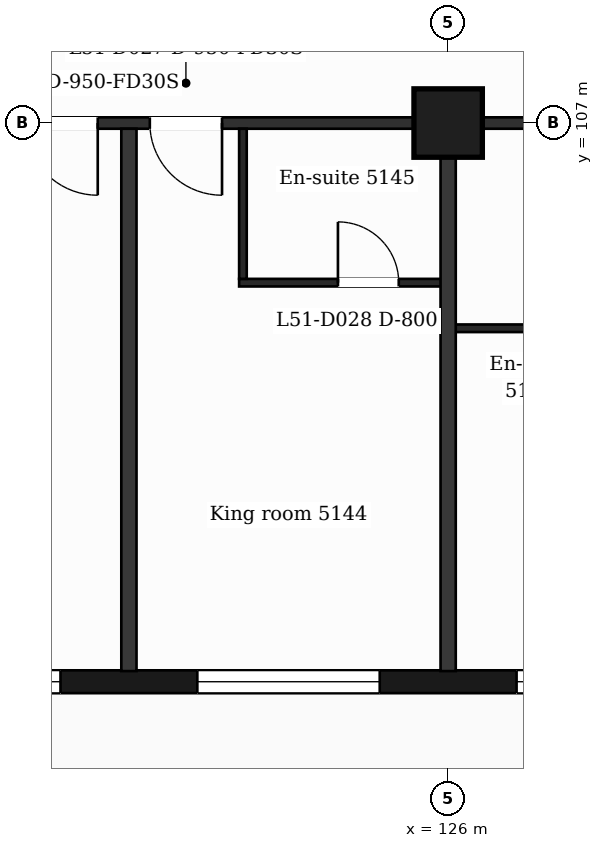
"""IFC4 building model, lengths in metres.
Left out: names, types, materials, properties, quantities, classifications, styles, units other than length and angle.
Written with IfcOpenShell. Run it as: python <this file> out.ifc"""

import sys

from ifc_helpers import new_model, si_unit, direction, frame, frame_2d, origin, origin_2d, place, context, subcontext, project, spatial, rectangle, extrude, element, fill, save


model = new_model("IFC4")
c1 = context("Model", 3, precision=1e-05, world=origin(), true_north=direction((0.0, 1.0)))
c2 = subcontext(c1, "Body", "Model", "MODEL_VIEW")
j1 = project(units=[si_unit("LENGTHUNIT", "METRE"), si_unit("PLANEANGLEUNIT", "RADIAN")], contexts=[c1])
p1 = place(None, origin())
s1 = spatial("IfcSite", under=j1, at=p1, CompositionType="ELEMENT")
p2 = place(p1, origin())
s2 = spatial("IfcBuilding", under=s1, at=p2, CompositionType="ELEMENT")
p3 = place(p2, frame((0.0, 0.0, 213.3)))
s3 = spatial("IfcBuildingStorey", under=s2, at=p3, CompositionType="ELEMENT", Elevation=213.3)
p4 = place(p3, frame((126.0, 107.0, 0.0), z_axis=(0.0, 0.0, 1.0), x_axis=(1.0, 0.0, 0.0)))
e1 = element("IfcColumn", 1, at=p4, inside=s3, PredefinedType="COLUMN", context=c2, shape_type="SweptSolid", body=[
    extrude(rectangle(XDim=0.9, YDim=0.9, at=origin_2d()), origin(), (0.0, 0.0, 1.0), 3.7),
])
p5 = place(p3, frame((89.85, 99.65, 0.0), z_axis=(0.0, 0.0, 1.0), x_axis=(1.0, 0.0, 0.0)))
e2 = element("IfcWall", 2, at=p5, inside=s3, PredefinedType="SOLIDWALL", context=c2, shape_type="SweptSolid", body=[
    extrude(rectangle(XDim=47.25, YDim=0.3, at=frame_2d((23.625, 0.0))), origin(), (0.0, 0.0, 1.0), 3.38),
])
p6 = place(p5, frame((0.725, 0.0, 0.9)))
e3 = element("IfcOpeningElement", 3, at=p6, cuts=e2, PredefinedType="OPENING", context=c2, shape_type="SweptSolid", body=[
    extrude(rectangle(XDim=1.2, YDim=2.1, at=frame_2d((0.6, 1.05))), frame((0.0, 0.16, 0.0), z_axis=(0.0, -1.0, 0.0), x_axis=(1.0, 0.0, 0.0)), (0.0, 0.0, 1.0), 0.32),
])
p7 = place(p5, frame((3.45, 0.0, 0.9)))
e4 = element("IfcOpeningElement", 4, at=p7, cuts=e2, PredefinedType="OPENING", context=c2, shape_type="SweptSolid", body=[
    extrude(rectangle(XDim=2.4, YDim=2.1, at=frame_2d((1.2, 1.05))), frame((0.0, 0.16, 0.0), z_axis=(0.0, -1.0, 0.0), x_axis=(1.0, 0.0, 0.0)), (0.0, 0.0, 1.0), 0.32),
])
p8 = place(p5, frame((7.35, 0.0, 0.0)))
e5 = element("IfcOpeningElement", 5, at=p8, cuts=e2, PredefinedType="OPENING", context=c2, shape_type="SweptSolid", body=[
    extrude(rectangle(XDim=1.2, YDim=2.4, at=frame_2d((0.6, 1.2))), frame((0.0, 0.16, 0.0), z_axis=(0.0, -1.0, 0.0), x_axis=(1.0, 0.0, 0.0)), (0.0, 0.0, 1.0), 0.32),
])
p9 = place(p5, frame((9.15, 0.0, 0.9)))
e6 = element("IfcOpeningElement", 6, at=p9, cuts=e2, PredefinedType="OPENING", context=c2, shape_type="SweptSolid", body=[
    extrude(rectangle(XDim=1.2, YDim=2.1, at=frame_2d((0.6, 1.05))), frame((0.0, 0.16, 0.0), z_axis=(0.0, -1.0, 0.0), x_axis=(1.0, 0.0, 0.0)), (0.0, 0.0, 1.0), 0.32),
])
p10 = place(p5, frame((11.85, 0.0, 0.9)))
e7 = element("IfcOpeningElement", 7, at=p10, cuts=e2, PredefinedType="OPENING", context=c2, shape_type="SweptSolid", body=[
    extrude(rectangle(XDim=2.4, YDim=2.1, at=frame_2d((1.2, 1.05))), frame((0.0, 0.16, 0.0), z_axis=(0.0, -1.0, 0.0), x_axis=(1.0, 0.0, 0.0)), (0.0, 0.0, 1.0), 0.32),
])
p11 = place(p5, frame((16.05, 0.0, 0.9)))
e8 = element("IfcOpeningElement", 8, at=p11, cuts=e2, PredefinedType="OPENING", context=c2, shape_type="SweptSolid", body=[
    extrude(rectangle(XDim=2.4, YDim=2.1, at=frame_2d((1.2, 1.05))), frame((0.0, 0.16, 0.0), z_axis=(0.0, -1.0, 0.0), x_axis=(1.0, 0.0, 0.0)), (0.0, 0.0, 1.0), 0.32),
])
p12 = place(p5, frame((20.85, 0.0, 0.9)))
e9 = element("IfcOpeningElement", 9, at=p12, cuts=e2, PredefinedType="OPENING", context=c2, shape_type="SweptSolid", body=[
    extrude(rectangle(XDim=1.2, YDim=2.1, at=frame_2d((0.6, 1.05))), frame((0.0, 0.16, 0.0), z_axis=(0.0, -1.0, 0.0), x_axis=(1.0, 0.0, 0.0)), (0.0, 0.0, 1.0), 0.32),
])
p13 = place(p5, frame((25.05, 0.0, 0.9)))
e10 = element("IfcOpeningElement", 10, at=p13, cuts=e2, PredefinedType="OPENING", context=c2, shape_type="SweptSolid", body=[
    extrude(rectangle(XDim=1.2, YDim=2.1, at=frame_2d((0.6, 1.05))), frame((0.0, 0.16, 0.0), z_axis=(0.0, -1.0, 0.0), x_axis=(1.0, 0.0, 0.0)), (0.0, 0.0, 1.0), 0.32),
])
p14 = place(p5, frame((28.65, 0.0, 0.9)))
e11 = element("IfcOpeningElement", 11, at=p14, cuts=e2, PredefinedType="OPENING", context=c2, shape_type="SweptSolid", body=[
    extrude(rectangle(XDim=2.4, YDim=2.1, at=frame_2d((1.2, 1.05))), frame((0.0, 0.16, 0.0), z_axis=(0.0, -1.0, 0.0), x_axis=(1.0, 0.0, 0.0)), (0.0, 0.0, 1.0), 0.32),
])
p15 = place(p5, frame((32.85, 0.0, 0.9)))
e12 = element("IfcOpeningElement", 12, at=p15, cuts=e2, PredefinedType="OPENING", context=c2, shape_type="SweptSolid", body=[
    extrude(rectangle(XDim=2.4, YDim=2.1, at=frame_2d((1.2, 1.05))), frame((0.0, 0.16, 0.0), z_axis=(0.0, -1.0, 0.0), x_axis=(1.0, 0.0, 0.0)), (0.0, 0.0, 1.0), 0.32),
])
p16 = place(p5, frame((37.05, 0.0, 0.9)))
e13 = element("IfcOpeningElement", 13, at=p16, cuts=e2, PredefinedType="OPENING", context=c2, shape_type="SweptSolid", body=[
    extrude(rectangle(XDim=2.4, YDim=2.1, at=frame_2d((1.2, 1.05))), frame((0.0, 0.16, 0.0), z_axis=(0.0, -1.0, 0.0), x_axis=(1.0, 0.0, 0.0)), (0.0, 0.0, 1.0), 0.32),
])
p17 = place(p5, frame((41.25, 0.0, 0.9)))
e14 = element("IfcOpeningElement", 14, at=p17, cuts=e2, PredefinedType="OPENING", context=c2, shape_type="SweptSolid", body=[
    extrude(rectangle(XDim=2.4, YDim=2.1, at=frame_2d((1.2, 1.05))), frame((0.0, 0.16, 0.0), z_axis=(0.0, -1.0, 0.0), x_axis=(1.0, 0.0, 0.0)), (0.0, 0.0, 1.0), 0.32),
])
p18 = place(p5, frame((45.25, 0.0, 0.9)))
e15 = element("IfcOpeningElement", 15, at=p18, cuts=e2, PredefinedType="OPENING", context=c2, shape_type="SweptSolid", body=[
    extrude(rectangle(XDim=1.2, YDim=2.1, at=frame_2d((0.6, 1.05))), frame((0.0, 0.16, 0.0), z_axis=(0.0, -1.0, 0.0), x_axis=(1.0, 0.0, 0.0)), (0.0, 0.0, 1.0), 0.32),
])
p19 = place(p3, frame((126.0, 104.3, 0.0), z_axis=(0.0, 0.0, 1.0), x_axis=(1.0, 0.0, 0.0)))
e16 = element("IfcWall", 16, at=p19, inside=s3, PredefinedType="PARTITIONING", context=c2, shape_type="SweptSolid", body=[
    extrude(rectangle(XDim=2.15, YDim=0.1, at=frame_2d((1.075, 0.0))), origin(), (0.0, 0.0, 1.0), 3.38),
])
p20 = place(p3, frame((123.25, 104.9, 0.0), z_axis=(0.0, 0.0, 1.0), x_axis=(1.0, 0.0, 0.0)))
e17 = element("IfcWall", 17, at=p20, inside=s3, PredefinedType="PARTITIONING", context=c2, shape_type="SweptSolid", body=[
    extrude(rectangle(XDim=2.75, YDim=0.1, at=frame_2d((1.375, 0.0))), origin(), (0.0, 0.0, 1.0), 3.38),
])
p21 = place(p20, frame((1.3, 0.0, 0.0)))
e18 = element("IfcOpeningElement", 18, at=p21, cuts=e17, PredefinedType="OPENING", context=c2, shape_type="SweptSolid", body=[
    extrude(rectangle(XDim=0.8, YDim=2.1, at=frame_2d((0.4, 1.05))), frame((0.0, 0.06, 0.0), z_axis=(0.0, -1.0, 0.0), x_axis=(1.0, 0.0, 0.0)), (0.0, 0.0, 1.0), 0.12),
])
p22 = place(p3, frame((87.018, 107.0, 0.0), z_axis=(0.0, 0.0, 1.0), x_axis=(1.0, 0.0, 0.0)))
e19 = element("IfcWall", 19, at=p22, inside=s3, PredefinedType="PARTITIONING", context=c2, shape_type="SweptSolid", body=[
    extrude(rectangle(XDim=52.765, YDim=0.15, at=frame_2d((26.382, 0.0))), origin(), (0.0, 0.0, 1.0), 3.38),
])
p23 = place(p22, frame((1.276, 0.0, 0.0)))
e20 = element("IfcOpeningElement", 20, at=p23, cuts=e19, PredefinedType="OPENING", context=c2, shape_type="SweptSolid", body=[
    extrude(rectangle(XDim=0.95, YDim=2.1, at=frame_2d((0.475, 1.05))), frame((0.0, 0.085, 0.0), z_axis=(0.0, -1.0, 0.0), x_axis=(1.0, 0.0, 0.0)), (0.0, 0.0, 1.0), 0.17),
])
p24 = place(p22, frame((6.034, 0.0, 0.0)))
e21 = element("IfcOpeningElement", 21, at=p24, cuts=e19, PredefinedType="OPENING", context=c2, shape_type="SweptSolid", body=[
    extrude(rectangle(XDim=0.95, YDim=2.1, at=frame_2d((0.475, 1.05))), frame((0.0, 0.085, 0.0), z_axis=(0.0, -1.0, 0.0), x_axis=(1.0, 0.0, 0.0)), (0.0, 0.0, 1.0), 0.17),
])
p25 = place(p22, frame((15.445, 0.0, 0.0)))
e22 = element("IfcOpeningElement", 22, at=p25, cuts=e19, PredefinedType="OPENING", context=c2, shape_type="SweptSolid", body=[
    extrude(rectangle(XDim=0.95, YDim=2.1, at=frame_2d((0.475, 1.05))), frame((0.0, 0.085, 0.0), z_axis=(0.0, -1.0, 0.0), x_axis=(1.0, 0.0, 0.0)), (0.0, 0.0, 1.0), 0.17),
])
p26 = place(p22, frame((18.369, 0.0, 0.0)))
e23 = element("IfcOpeningElement", 23, at=p26, cuts=e19, PredefinedType="OPENING", context=c2, shape_type="SweptSolid", body=[
    extrude(rectangle(XDim=0.95, YDim=2.1, at=frame_2d((0.475, 1.05))), frame((0.0, 0.085, 0.0), z_axis=(0.0, -1.0, 0.0), x_axis=(1.0, 0.0, 0.0)), (0.0, 0.0, 1.0), 0.17),
])
p27 = place(p22, frame((24.519, 0.0, 0.0)))
e24 = element("IfcOpeningElement", 24, at=p27, cuts=e19, PredefinedType="OPENING", context=c2, shape_type="SweptSolid", body=[
    extrude(rectangle(XDim=0.95, YDim=2.1, at=frame_2d((0.475, 1.05))), frame((0.0, 0.085, 0.0), z_axis=(0.0, -1.0, 0.0), x_axis=(1.0, 0.0, 0.0)), (0.0, 0.0, 1.0), 0.17),
])
p28 = place(p22, frame((26.632, 0.0, 0.0)))
e25 = element("IfcOpeningElement", 25, at=p28, cuts=e19, PredefinedType="OPENING", context=c2, shape_type="SweptSolid", body=[
    extrude(rectangle(XDim=1.0, YDim=2.1, at=frame_2d((0.5, 1.05))), frame((0.0, 0.085, 0.0), z_axis=(0.0, -1.0, 0.0), x_axis=(1.0, 0.0, 0.0)), (0.0, 0.0, 1.0), 0.17),
])
p29 = place(p22, frame((33.422, 0.0, 0.0)))
e26 = element("IfcOpeningElement", 26, at=p29, cuts=e19, PredefinedType="OPENING", context=c2, shape_type="SweptSolid", body=[
    extrude(rectangle(XDim=0.95, YDim=2.1, at=frame_2d((0.475, 1.05))), frame((0.0, 0.085, 0.0), z_axis=(0.0, -1.0, 0.0), x_axis=(1.0, 0.0, 0.0)), (0.0, 0.0, 1.0), 0.17),
])
p30 = place(p22, frame((35.057, 0.0, 0.0)))
e27 = element("IfcOpeningElement", 27, at=p30, cuts=e19, PredefinedType="OPENING", context=c2, shape_type="SweptSolid", body=[
    extrude(rectangle(XDim=0.95, YDim=2.1, at=frame_2d((0.475, 1.05))), frame((0.0, 0.085, 0.0), z_axis=(0.0, -1.0, 0.0), x_axis=(1.0, 0.0, 0.0)), (0.0, 0.0, 1.0), 0.17),
])
p31 = place(p22, frame((44.532, 0.0, 0.0)))
e28 = element("IfcOpeningElement", 28, at=p31, cuts=e19, PredefinedType="OPENING", context=c2, shape_type="SweptSolid", body=[
    extrude(rectangle(XDim=1.0, YDim=2.1, at=frame_2d((0.5, 1.05))), frame((0.0, 0.085, 0.0), z_axis=(0.0, -1.0, 0.0), x_axis=(1.0, 0.0, 0.0)), (0.0, 0.0, 1.0), 0.17),
])
p32 = place(p22, frame((48.249, 0.0, 0.0)))
e29 = element("IfcOpeningElement", 29, at=p32, cuts=e19, PredefinedType="OPENING", context=c2, shape_type="SweptSolid", body=[
    extrude(rectangle(XDim=0.95, YDim=2.1, at=frame_2d((0.475, 1.05))), frame((0.0, 0.085, 0.0), z_axis=(0.0, -1.0, 0.0), x_axis=(1.0, 0.0, 0.0)), (0.0, 0.0, 1.0), 0.17),
])
p33 = place(p3, frame((121.8, 99.79, 0.0), z_axis=(0.0, 0.0, 1.0), x_axis=(0.0, 1.0, 0.0)))
e30 = element("IfcWall", 30, at=p33, inside=s3, PredefinedType="PARTITIONING", context=c2, shape_type="SweptSolid", body=[
    extrude(rectangle(XDim=7.135, YDim=0.2, at=frame_2d((3.567, 0.0))), origin(), (0.0, 0.0, 1.0), 3.38),
])
p34 = place(p3, frame((123.3, 104.95, 0.0), z_axis=(0.0, 0.0, 1.0), x_axis=(0.0, 1.0, 0.0)))
e31 = element("IfcWall", 31, at=p34, inside=s3, PredefinedType="PARTITIONING", context=c2, shape_type="SweptSolid", body=[
    extrude(rectangle(XDim=1.975, YDim=0.1, at=frame_2d((0.988, 0.0))), origin(), (0.0, 0.0, 1.0), 3.38),
])
p35 = place(p3, frame((126.0, 99.79, 0.0), z_axis=(0.0, 0.0, 1.0), x_axis=(0.0, 1.0, 0.0)))
e32 = element("IfcWall", 32, at=p35, inside=s3, PredefinedType="PARTITIONING", context=c2, shape_type="SweptSolid", body=[
    extrude(rectangle(XDim=7.135, YDim=0.2, at=frame_2d((3.567, 0.0))), origin(), (0.0, 0.0, 1.0), 3.38),
])
p36 = place(p14, origin())
e33 = element("IfcWindow", 33, at=p36, inside=s3, PartitioningType="SINGLE_PANEL", PredefinedType="WINDOW", context=c2, shape_type="SweptSolid", body=[
    extrude(rectangle(XDim=2.4, YDim=2.1, at=frame_2d((1.2, 1.05))), frame((0.0, 0.03, 0.0), z_axis=(0.0, -1.0, 0.0), x_axis=(1.0, 0.0, 0.0)), (0.0, 0.0, 1.0), 0.06),
])
fill(e11, e33)
p37 = place(p15, origin())
e34 = element("IfcWindow", 34, at=p37, inside=s3, PartitioningType="SINGLE_PANEL", PredefinedType="WINDOW", context=c2, shape_type="SweptSolid", body=[
    extrude(rectangle(XDim=2.4, YDim=2.1, at=frame_2d((1.2, 1.05))), frame((0.0, 0.03, 0.0), z_axis=(0.0, -1.0, 0.0), x_axis=(1.0, 0.0, 0.0)), (0.0, 0.0, 1.0), 0.06),
])
fill(e12, e34)
p38 = place(p16, origin())
e35 = element("IfcWindow", 35, at=p38, inside=s3, PartitioningType="SINGLE_PANEL", PredefinedType="WINDOW", context=c2, shape_type="SweptSolid", body=[
    extrude(rectangle(XDim=2.4, YDim=2.1, at=frame_2d((1.2, 1.05))), frame((0.0, 0.03, 0.0), z_axis=(0.0, -1.0, 0.0), x_axis=(1.0, 0.0, 0.0)), (0.0, 0.0, 1.0), 0.06),
])
fill(e13, e35)
p39 = place(p29, origin())
e36 = element("IfcDoor", 36, at=p39, inside=s3, OperationType="SINGLE_SWING_RIGHT", PredefinedType="DOOR", context=c2, shape_type="SweptSolid", body=[
    extrude(rectangle(XDim=0.95, YDim=2.1, at=frame_2d((0.475, 1.05))), frame((0.0, 0.025, 0.0), z_axis=(0.0, -1.0, 0.0), x_axis=(1.0, 0.0, 0.0)), (0.0, 0.0, 1.0), 0.05),
])
fill(e26, e36)
p40 = place(p30, origin())
e37 = element("IfcDoor", 37, at=p40, inside=s3, OperationType="SINGLE_SWING_RIGHT", PredefinedType="DOOR", context=c2, shape_type="SweptSolid", body=[
    extrude(rectangle(XDim=0.95, YDim=2.1, at=frame_2d((0.475, 1.05))), frame((0.0, 0.025, 0.0), z_axis=(0.0, -1.0, 0.0), x_axis=(1.0, 0.0, 0.0)), (0.0, 0.0, 1.0), 0.05),
])
fill(e27, e37)
p41 = place(p21, origin())
e38 = element("IfcDoor", 38, at=p41, inside=s3, OperationType="SINGLE_SWING_LEFT", PredefinedType="DOOR", context=c2, shape_type="SweptSolid", body=[
    extrude(rectangle(XDim=0.8, YDim=2.1, at=frame_2d((0.4, 1.05))), frame((0.0, 0.025, 0.0), z_axis=(0.0, -1.0, 0.0), x_axis=(1.0, 0.0, 0.0)), (0.0, 0.0, 1.0), 0.05),
])
fill(e18, e38)
save(model, sys.argv[1])
